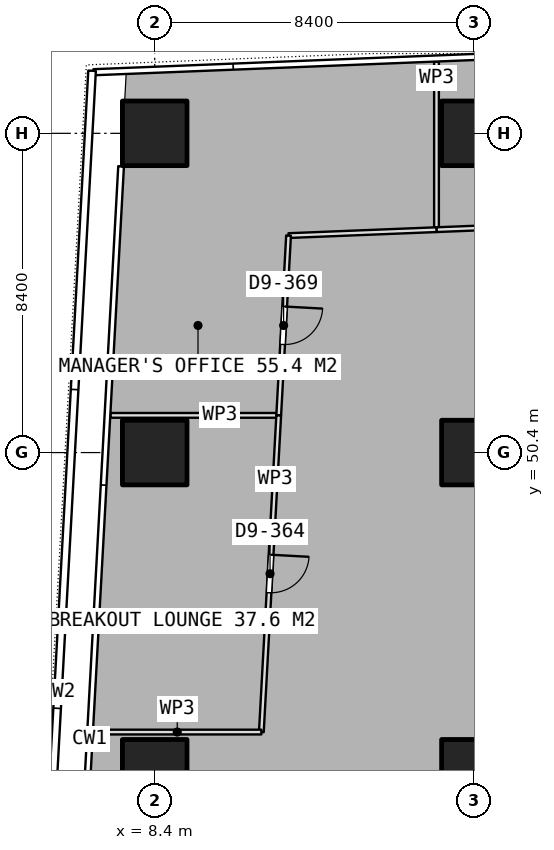
"""IFC4 building model, lengths in metres.
Left out: names, types, materials, properties, quantities, classifications, styles, units other than length and angle.
Written with IfcOpenShell. Run it as: python <this file> out.ifc"""

import sys

from ifc_helpers import new_model, si_unit, direction, frame, frame_2d, origin, origin_2d, place, context, subcontext, project, spatial, rectangle, extrude, element, fill, save


model = new_model("IFC4")
c1 = context("Model", 3, precision=1e-05, world=origin(), true_north=direction((0.0, 1.0)))
c2 = subcontext(c1, "Body", "Model", "MODEL_VIEW")
j1 = project(units=[si_unit("LENGTHUNIT", "METRE"), si_unit("PLANEANGLEUNIT", "RADIAN")], contexts=[c1])
p1 = place(None, origin())
s1 = spatial("IfcSite", under=j1, at=p1, CompositionType="ELEMENT")
p2 = place(p1, origin())
s2 = spatial("IfcBuilding", under=s1, at=p2, CompositionType="ELEMENT")
p3 = place(p2, frame((0.0, 0.0, 106.55)))
s3 = spatial("IfcBuildingStorey", under=s2, at=p3, CompositionType="ELEMENT", Elevation=106.55)
for number, where, z_axis, x_axis in (
    (1, (8.4, 42.0, 0.0), (0.0, 0.0, 1.0), (1.0, 0.0, 0.0)),
    (2, (8.4, 50.4, 0.0), (0.0, 0.0, 1.0), (1.0, 0.0, 0.0)),
    (3, (8.4, 58.8, 0.0), (0.0, 0.0, 1.0), (1.0, 0.0, 0.0)),
    (4, (16.8, 42.0, 0.0), (0.0, 0.0, 1.0), (1.0, 0.0, 0.0)),
    (5, (16.8, 50.4, 0.0), (0.0, 0.0, 1.0), (1.0, 0.0, 0.0)),
    (6, (16.8, 58.8, 0.0), (0.0, 0.0, 1.0), (1.0, 0.0, 0.0)),
):
    element("IfcColumn", number, at=place(p3, frame(where, z_axis=z_axis, x_axis=x_axis)), inside=s3, PredefinedType="COLUMN", context=c2, shape_type="SweptSolid", body=[
        extrude(rectangle(XDim=1.7, YDim=1.7, at=origin_2d()), origin(), (0.0, 0.0, 1.0), 3.75),
    ])
p4 = place(p3, frame((15.815, 56.265, 0.0), z_axis=(0.0, 0.0, 1.0), x_axis=(0.0, 1.0, 0.0)))
e7 = element("IfcWall", 7, at=p4, inside=s3, PredefinedType="PARTITIONING", context=c2, shape_type="SweptSolid", body=[
    extrude(rectangle(XDim=4.424, YDim=0.125, at=frame_2d((2.212, 0.0))), origin(), (0.0, 0.0, 1.0), 3.5),
])
p5 = place(p3, frame((25.413, 56.65, 0.0), z_axis=(0.0, 0.0, 1.0), x_axis=(-0.999196445736, -0.040080703946, 0.0)))
e8 = element("IfcWall", 8, at=p5, inside=s3, PredefinedType="PARTITIONING", context=c2, shape_type="SweptSolid", body=[
    extrude(rectangle(XDim=9.606, YDim=0.125, at=frame_2d((4.803, 0.0))), origin(), (0.0, 0.0, 1.0), 3.5),
])
p6 = place(p5, frame((4.303, 0.0, 0.0)))
e9 = element("IfcOpeningElement", 9, at=p6, cuts=e8, PredefinedType="OPENING", context=c2, shape_type="SweptSolid", body=[
    extrude(rectangle(XDim=1.0, YDim=2.1, at=frame_2d((0.5, 1.05))), frame((0.0, 0.073, 0.0), z_axis=(0.0, -1.0, 0.0), x_axis=(1.0, 0.0, 0.0)), (0.0, 0.0, 1.0), 0.145),
])
p7 = place(p3, frame((11.663, 51.379, 0.0), z_axis=(0.0, 0.0, 1.0), x_axis=(-1.0, 0.0, 0.0)))
e10 = element("IfcWall", 10, at=p7, inside=s3, PredefinedType="PARTITIONING", context=c2, shape_type="SweptSolid", body=[
    extrude(rectangle(XDim=4.427, YDim=0.125, at=frame_2d((2.213, 0.0))), origin(), (0.0, 0.0, 1.0), 3.5),
])
p8 = place(p3, frame((15.814, 56.265, 0.0), z_axis=(0.0, 0.0, 1.0), x_axis=(-0.999197550699, -0.040053148165, 0.0)))
e11 = element("IfcWall", 11, at=p8, inside=s3, PredefinedType="PARTITIONING", context=c2, shape_type="SweptSolid", body=[
    extrude(rectangle(XDim=3.895, YDim=0.125, at=frame_2d((1.948, 0.0))), origin(), (0.0, 0.0, 1.0), 3.5),
])
p9 = place(p3, frame((11.922, 56.109, 0.0), z_axis=(0.0, 0.0, 1.0), x_axis=(-0.054682179352, -0.998503810339, 0.0)))
e12 = element("IfcWall", 12, at=p9, inside=s3, PredefinedType="PARTITIONING", context=c2, shape_type="SweptSolid", body=[
    extrude(rectangle(XDim=4.737, YDim=0.125, at=frame_2d((2.369, 0.0))), origin(), (0.0, 0.0, 1.0), 3.5),
])
p10 = place(p9, frame((1.869, 0.0, 0.0)))
e13 = element("IfcOpeningElement", 13, at=p10, cuts=e12, PredefinedType="OPENING", context=c2, shape_type="SweptSolid", body=[
    extrude(rectangle(XDim=1.0, YDim=2.1, at=frame_2d((0.5, 1.05))), frame((0.0, 0.073, 0.0), z_axis=(0.0, -1.0, 0.0), x_axis=(1.0, 0.0, 0.0)), (0.0, 0.0, 1.0), 0.145),
])
p11 = place(p3, frame((11.663, 51.378, 0.0), z_axis=(0.0, 0.0, 1.0), x_axis=(-0.054769987218, -0.998498997746, 0.0)))
e14 = element("IfcWall", 14, at=p11, inside=s3, PredefinedType="PARTITIONING", context=c2, shape_type="SweptSolid", body=[
    extrude(rectangle(XDim=8.344, YDim=0.125, at=frame_2d((4.172, 0.0))), origin(), (0.0, 0.0, 1.0), 3.5),
])
p12 = place(p11, frame((3.672, 0.0, 0.0)))
e15 = element("IfcOpeningElement", 15, at=p12, cuts=e14, PredefinedType="OPENING", context=c2, shape_type="SweptSolid", body=[
    extrude(rectangle(XDim=1.0, YDim=2.1, at=frame_2d((0.5, 1.05))), frame((0.0, 0.073, 0.0), z_axis=(0.0, -1.0, 0.0), x_axis=(1.0, 0.0, 0.0)), (0.0, 0.0, 1.0), 0.145),
])
p13 = place(p3, frame((11.206, 43.046, 0.0), z_axis=(0.0, 0.0, 1.0), x_axis=(-1.0, 0.0, 0.0)))
e16 = element("IfcWall", 16, at=p13, inside=s3, PredefinedType="PARTITIONING", context=c2, shape_type="SweptSolid", body=[
    extrude(rectangle(XDim=4.427, YDim=0.125, at=frame_2d((2.213, 0.0))), origin(), (0.0, 0.0, 1.0), 3.5),
])
p14 = place(p10, origin())
e17 = element("IfcDoor", 17, at=p14, inside=s3, OperationType="SINGLE_SWING_LEFT", PredefinedType="DOOR", context=c2, shape_type="SweptSolid", body=[
    extrude(rectangle(XDim=1.0, YDim=2.1, at=frame_2d((0.5, 1.05))), frame((0.0, 0.025, 0.0), z_axis=(0.0, -1.0, 0.0), x_axis=(1.0, 0.0, 0.0)), (0.0, 0.0, 1.0), 0.05),
])
fill(e13, e17)
p15 = place(p12, origin())
e18 = element("IfcDoor", 18, at=p15, inside=s3, OperationType="SINGLE_SWING_LEFT", PredefinedType="DOOR", context=c2, shape_type="SweptSolid", body=[
    extrude(rectangle(XDim=1.0, YDim=2.1, at=frame_2d((0.5, 1.05))), frame((0.0, 0.025, 0.0), z_axis=(0.0, -1.0, 0.0), x_axis=(1.0, 0.0, 0.0)), (0.0, 0.0, 1.0), 0.05),
])
fill(e15, e18)
save(model, sys.argv[1])
